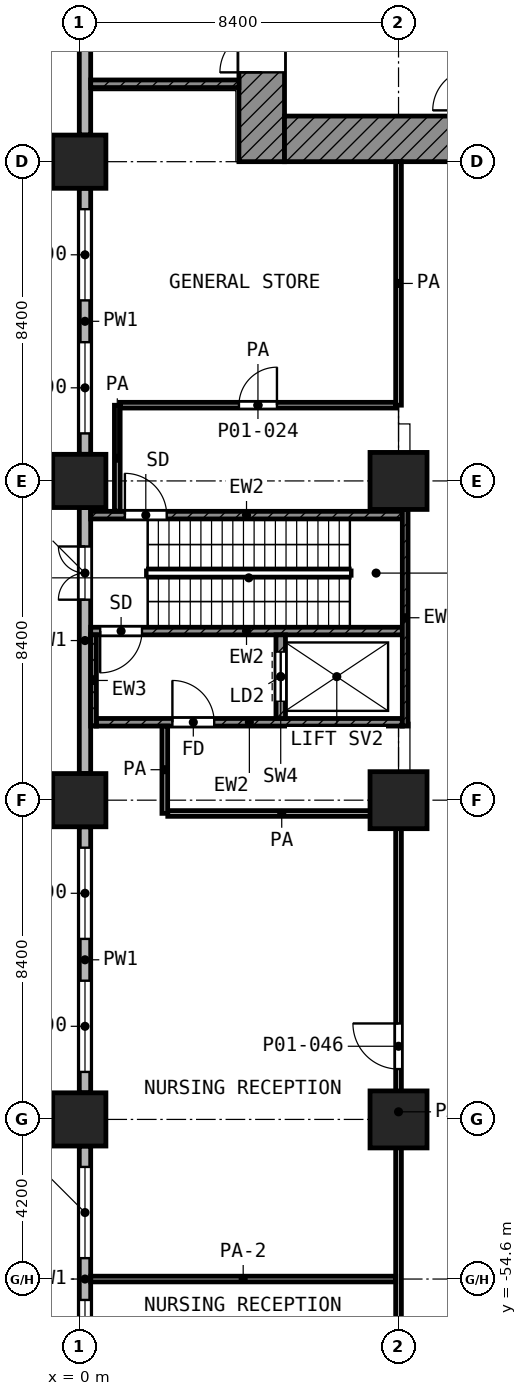
"""IFC4 building model, lengths in metres.
Left out: names, types, materials, properties, quantities, classifications, styles, units other than length and angle.
Written with IfcOpenShell. Run it as: python <this file> out.ifc"""

import sys

from ifc_helpers import new_model, si_unit, direction, frame, frame_2d, origin, origin_2d, place, context, subcontext, project, spatial, rectangle, extrude, element, fill, save


model = new_model("IFC4")
c1 = context("Model", 3, precision=1e-05, world=origin(), true_north=direction((0.0, 1.0)))
c2 = subcontext(c1, "Body", "Model", "MODEL_VIEW")
j1 = project(units=[si_unit("LENGTHUNIT", "METRE"), si_unit("PLANEANGLEUNIT", "RADIAN")], contexts=[c1])
p1 = place(None, origin())
s1 = spatial("IfcSite", under=j1, at=p1, CompositionType="ELEMENT")
p2 = place(p1, origin())
s2 = spatial("IfcBuilding", under=s1, at=p2, CompositionType="ELEMENT")
p3 = place(p2, origin())
s3 = spatial("IfcBuildingStorey", under=s2, at=p3, CompositionType="ELEMENT", Elevation=0.0)
for number, where, z_axis, x_axis in (
    (1, (0.0, -25.2, 0.0), (0.0, 0.0, 1.0), (1.0, 0.0, 0.0)),
    (2, (0.0, -33.6, 0.0), (0.0, 0.0, 1.0), (1.0, 0.0, 0.0)),
):
    element("IfcColumn", number, at=place(p3, frame(where, z_axis=z_axis, x_axis=x_axis)), inside=s3, PredefinedType="COLUMN", context=c2, shape_type="SweptSolid", body=[
        extrude(rectangle(XDim=1.4, YDim=1.4, at=origin_2d()), origin(), (0.0, 0.0, 1.0), 7.0),
    ])
p4 = place(p3, frame((8.4, -33.6, 0.0), z_axis=(0.0, 0.0, 1.0), x_axis=(1.0, 0.0, 0.0)))
e3 = element("IfcColumn", 3, at=p4, inside=s3, PredefinedType="COLUMN", context=c2, shape_type="SweptSolid", body=[
    extrude(rectangle(XDim=1.5, YDim=1.5, at=origin_2d()), origin(), (0.0, 0.0, 1.0), 7.0),
])
p5 = place(p3, frame((0.0, -42.0, 0.0), z_axis=(0.0, 0.0, 1.0), x_axis=(1.0, 0.0, 0.0)))
e4 = element("IfcColumn", 4, at=p5, inside=s3, PredefinedType="COLUMN", context=c2, shape_type="SweptSolid", body=[
    extrude(rectangle(XDim=1.4, YDim=1.4, at=origin_2d()), origin(), (0.0, 0.0, 1.0), 7.0),
])
p6 = place(p3, frame((8.4, -42.0, 0.0), z_axis=(0.0, 0.0, 1.0), x_axis=(1.0, 0.0, 0.0)))
e5 = element("IfcColumn", 5, at=p6, inside=s3, PredefinedType="COLUMN", context=c2, shape_type="SweptSolid", body=[
    extrude(rectangle(XDim=1.5, YDim=1.5, at=origin_2d()), origin(), (0.0, 0.0, 1.0), 7.0),
])
p7 = place(p3, frame((0.0, -50.4, 0.0), z_axis=(0.0, 0.0, 1.0), x_axis=(1.0, 0.0, 0.0)))
e6 = element("IfcColumn", 6, at=p7, inside=s3, PredefinedType="COLUMN", context=c2, shape_type="SweptSolid", body=[
    extrude(rectangle(XDim=1.4, YDim=1.4, at=origin_2d()), origin(), (0.0, 0.0, 1.0), 7.0),
])
p8 = place(p3, frame((8.4, -50.4, 0.0), z_axis=(0.0, 0.0, 1.0), x_axis=(1.0, 0.0, 0.0)))
e7 = element("IfcColumn", 7, at=p8, inside=s3, PredefinedType="COLUMN", context=c2, shape_type="SweptSolid", body=[
    extrude(rectangle(XDim=1.5, YDim=1.5, at=origin_2d()), origin(), (0.0, 0.0, 1.0), 7.0),
])
p9 = place(p3, frame((0.15, -17.5, 0.0), z_axis=(0.0, 0.0, 1.0), x_axis=(0.0, -1.0, 0.0)))
e8 = element("IfcWall", 8, at=p9, inside=s3, PredefinedType="SOLIDWALL", context=c2, shape_type="SweptSolid", body=[
    extrude(rectangle(XDim=7.0, YDim=0.3, at=frame_2d((3.5, 0.0))), origin(), (0.0, 0.0, 1.0), 5.25),
])
p10 = place(p9, frame((0.825, 0.0, 0.0)))
e9 = element("IfcOpeningElement", 9, at=p10, cuts=e8, PredefinedType="OPENING", context=c2, shape_type="SweptSolid", body=[
    extrude(rectangle(XDim=1.4, YDim=2.1, at=frame_2d((0.7, 1.05))), frame((0.0, 0.16, 0.0), z_axis=(0.0, -1.0, 0.0), x_axis=(1.0, 0.0, 0.0)), (0.0, 0.0, 1.0), 0.32),
])
p11 = place(p3, frame((0.15, -25.9, 0.0), z_axis=(0.0, 0.0, 1.0), x_axis=(0.0, -1.0, 0.0)))
e10 = element("IfcWall", 10, at=p11, inside=s3, PredefinedType="SOLIDWALL", context=c2, shape_type="SweptSolid", body=[
    extrude(rectangle(XDim=7.0, YDim=0.3, at=frame_2d((3.5, 0.0))), origin(), (0.0, 0.0, 1.0), 5.25),
])
p12 = place(p11, frame((0.55, 0.0, 1.0)))
e11 = element("IfcOpeningElement", 11, at=p12, cuts=e10, PredefinedType="OPENING", context=c2, shape_type="SweptSolid", body=[
    extrude(rectangle(XDim=2.4, YDim=1.8, at=frame_2d((1.2, 0.9))), frame((0.0, 0.16, 0.0), z_axis=(0.0, -1.0, 0.0), x_axis=(1.0, 0.0, 0.0)), (0.0, 0.0, 1.0), 0.32),
])
p13 = place(p11, frame((4.05, 0.0, 1.0)))
e12 = element("IfcOpeningElement", 12, at=p13, cuts=e10, PredefinedType="OPENING", context=c2, shape_type="SweptSolid", body=[
    extrude(rectangle(XDim=2.4, YDim=1.8, at=frame_2d((1.2, 0.9))), frame((0.0, 0.16, 0.0), z_axis=(0.0, -1.0, 0.0), x_axis=(1.0, 0.0, 0.0)), (0.0, 0.0, 1.0), 0.32),
])
p14 = place(p3, frame((0.15, -34.3, 0.0), z_axis=(0.0, 0.0, 1.0), x_axis=(0.0, -1.0, 0.0)))
e13 = element("IfcWall", 13, at=p14, inside=s3, PredefinedType="SOLIDWALL", context=c2, shape_type="SweptSolid", body=[
    extrude(rectangle(XDim=7.0, YDim=0.3, at=frame_2d((3.5, 0.0))), origin(), (0.0, 0.0, 1.0), 5.25),
])
p15 = place(p14, frame((1.025, 0.0, 0.0)))
e14 = element("IfcOpeningElement", 14, at=p15, cuts=e13, PredefinedType="OPENING", context=c2, shape_type="SweptSolid", body=[
    extrude(rectangle(XDim=1.4, YDim=2.1, at=frame_2d((0.7, 1.05))), frame((0.0, 0.16, 0.0), z_axis=(0.0, -1.0, 0.0), x_axis=(1.0, 0.0, 0.0)), (0.0, 0.0, 1.0), 0.32),
])
p16 = place(p3, frame((0.15, -42.7, 0.0), z_axis=(0.0, 0.0, 1.0), x_axis=(0.0, -1.0, 0.0)))
e15 = element("IfcWall", 15, at=p16, inside=s3, PredefinedType="SOLIDWALL", context=c2, shape_type="SweptSolid", body=[
    extrude(rectangle(XDim=7.0, YDim=0.3, at=frame_2d((3.5, 0.0))), origin(), (0.0, 0.0, 1.0), 5.25),
])
p17 = place(p16, frame((0.55, 0.0, 1.0)))
e16 = element("IfcOpeningElement", 16, at=p17, cuts=e15, PredefinedType="OPENING", context=c2, shape_type="SweptSolid", body=[
    extrude(rectangle(XDim=2.4, YDim=1.8, at=frame_2d((1.2, 0.9))), frame((0.0, 0.16, 0.0), z_axis=(0.0, -1.0, 0.0), x_axis=(1.0, 0.0, 0.0)), (0.0, 0.0, 1.0), 0.32),
])
p18 = place(p16, frame((4.05, 0.0, 1.0)))
e17 = element("IfcOpeningElement", 17, at=p18, cuts=e15, PredefinedType="OPENING", context=c2, shape_type="SweptSolid", body=[
    extrude(rectangle(XDim=2.4, YDim=1.8, at=frame_2d((1.2, 0.9))), frame((0.0, 0.16, 0.0), z_axis=(0.0, -1.0, 0.0), x_axis=(1.0, 0.0, 0.0)), (0.0, 0.0, 1.0), 0.32),
])
p19 = place(p3, frame((0.15, -51.1, 0.0), z_axis=(0.0, 0.0, 1.0), x_axis=(0.0, -1.0, 0.0)))
e18 = element("IfcWall", 18, at=p19, inside=s3, PredefinedType="SOLIDWALL", context=c2, shape_type="SweptSolid", body=[
    extrude(rectangle(XDim=7.0, YDim=0.3, at=frame_2d((3.5, 0.0))), origin(), (0.0, 0.0, 1.0), 5.25),
])
p20 = place(p19, frame((0.55, 0.0, 1.0)))
e19 = element("IfcOpeningElement", 19, at=p20, cuts=e18, PredefinedType="OPENING", context=c2, shape_type="SweptSolid", body=[
    extrude(rectangle(XDim=2.4, YDim=1.8, at=frame_2d((1.2, 0.9))), frame((0.0, 0.16, 0.0), z_axis=(0.0, -1.0, 0.0), x_axis=(1.0, 0.0, 0.0)), (0.0, 0.0, 1.0), 0.32),
])
p21 = place(p19, frame((4.05, 0.0, 1.0)))
e20 = element("IfcOpeningElement", 20, at=p21, cuts=e18, PredefinedType="OPENING", context=c2, shape_type="SweptSolid", body=[
    extrude(rectangle(XDim=2.4, YDim=1.8, at=frame_2d((1.2, 0.9))), frame((0.0, 0.16, 0.0), z_axis=(0.0, -1.0, 0.0), x_axis=(1.0, 0.0, 0.0)), (0.0, 0.0, 1.0), 0.32),
])
p22 = place(p3, frame((4.8, -25.2, 0.0), z_axis=(0.0, 0.0, 1.0), x_axis=(0.0, 1.0, 0.0)))
e21 = element("IfcWall", 21, at=p22, inside=s3, PredefinedType="SHEAR", context=c2, shape_type="SweptSolid", body=[
    extrude(rectangle(XDim=19.8, YDim=1.2, at=frame_2d((9.9, 0.0))), origin(), (0.0, 0.0, 1.0), 6.65),
])
p23 = place(p22, frame((11.65, 0.0, 0.0)))
e22 = element("IfcOpeningElement", 22, at=p23, cuts=e21, PredefinedType="OPENING", context=c2, shape_type="SweptSolid", body=[
    extrude(rectangle(XDim=1.1, YDim=2.1, at=frame_2d((0.55, 1.05))), frame((0.0, 0.61, 0.0), z_axis=(0.0, -1.0, 0.0), x_axis=(1.0, 0.0, 0.0)), (0.0, 0.0, 1.0), 1.22),
])
p24 = place(p22, frame((2.35, 0.0, 0.0)))
e23 = element("IfcOpeningElement", 23, at=p24, cuts=e21, PredefinedType="OPENING", context=c2, shape_type="SweptSolid", body=[
    extrude(rectangle(XDim=1.1, YDim=2.1, at=frame_2d((0.55, 1.05))), frame((0.0, 0.61, 0.0), z_axis=(0.0, -1.0, 0.0), x_axis=(1.0, 0.0, 0.0)), (0.0, 0.0, 1.0), 1.22),
])
p25 = place(p3, frame((5.4, -24.6, 0.0), z_axis=(0.0, 0.0, 1.0), x_axis=(1.0, 0.0, 0.0)))
e24 = element("IfcWall", 24, at=p25, inside=s3, PredefinedType="SHEAR", context=c2, shape_type="SweptSolid", body=[
    extrude(rectangle(XDim=18.6, YDim=1.2, at=frame_2d((9.3, 0.0))), origin(), (0.0, 0.0, 1.0), 6.65),
])
p26 = place(p25, frame((6.3, 0.0, 0.0)))
e25 = element("IfcOpeningElement", 25, at=p26, cuts=e24, PredefinedType="OPENING", context=c2, shape_type="SweptSolid", body=[
    extrude(rectangle(XDim=1.8, YDim=2.1, at=frame_2d((0.9, 1.05))), frame((0.0, 0.61, 0.0), z_axis=(0.0, -1.0, 0.0), x_axis=(1.0, 0.0, 0.0)), (0.0, 0.0, 1.0), 1.22),
])
p27 = place(p3, frame((0.3, -23.15, 0.0), z_axis=(0.0, 0.0, 1.0), x_axis=(1.0, 0.0, 0.0)))
e26 = element("IfcWall", 26, at=p27, inside=s3, PredefinedType="SHEAR", context=c2, shape_type="SweptSolid", body=[
    extrude(rectangle(XDim=3.9, YDim=0.2, at=frame_2d((1.95, 0.0))), origin(), (0.0, 0.0, 1.0), 6.65),
])
p28 = place(p3, frame((0.375, -40.05, 0.0), z_axis=(0.0, 0.0, 1.0), x_axis=(0.0, 1.0, 0.0)))
e27 = element("IfcWall", 27, at=p28, inside=s3, PredefinedType="SHEAR", context=c2, shape_type="SweptSolid", body=[
    extrude(rectangle(XDim=2.4, YDim=0.15, at=frame_2d((1.2, 0.0))), origin(), (0.0, 0.0, 1.0), 6.65),
])
p29 = place(p3, frame((8.575, -40.05, 0.0), z_axis=(0.0, 0.0, 1.0), x_axis=(0.0, 1.0, 0.0)))
e28 = element("IfcWall", 28, at=p29, inside=s3, PredefinedType="SHEAR", context=c2, shape_type="SweptSolid", body=[
    extrude(rectangle(XDim=5.7, YDim=0.15, at=frame_2d((2.85, 0.0))), origin(), (0.0, 0.0, 1.0), 6.65),
])
p30 = place(p3, frame((0.3, -34.5, 0.0), z_axis=(0.0, 0.0, 1.0), x_axis=(1.0, 0.0, 0.0)))
e29 = element("IfcWall", 29, at=p30, inside=s3, PredefinedType="SHEAR", context=c2, shape_type="SweptSolid", body=[
    extrude(rectangle(XDim=8.2, YDim=0.2, at=frame_2d((4.1, 0.0))), origin(), (0.0, 0.0, 1.0), 6.65),
])
p31 = place(p30, frame((0.9, 0.0, 0.0)))
e30 = element("IfcOpeningElement", 30, at=p31, cuts=e29, PredefinedType="OPENING", context=c2, shape_type="SweptSolid", body=[
    extrude(rectangle(XDim=1.1, YDim=2.1, at=frame_2d((0.55, 1.05))), frame((0.0, 0.11, 0.0), z_axis=(0.0, -1.0, 0.0), x_axis=(1.0, 0.0, 0.0)), (0.0, 0.0, 1.0), 0.22),
])
p32 = place(p3, frame((0.3, -37.55, 0.0), z_axis=(0.0, 0.0, 1.0), x_axis=(1.0, 0.0, 0.0)))
e31 = element("IfcWall", 31, at=p32, inside=s3, PredefinedType="SHEAR", context=c2, shape_type="SweptSolid", body=[
    extrude(rectangle(XDim=8.2, YDim=0.2, at=frame_2d((4.1, 0.0))), origin(), (0.0, 0.0, 1.0), 6.65),
])
p33 = place(p32, frame((0.25, 0.0, 0.0)))
e32 = element("IfcOpeningElement", 32, at=p33, cuts=e31, PredefinedType="OPENING", context=c2, shape_type="SweptSolid", body=[
    extrude(rectangle(XDim=1.1, YDim=2.1, at=frame_2d((0.55, 1.05))), frame((0.0, 0.11, 0.0), z_axis=(0.0, -1.0, 0.0), x_axis=(1.0, 0.0, 0.0)), (0.0, 0.0, 1.0), 0.22),
])
p34 = place(p3, frame((0.45, -39.95, 0.0), z_axis=(0.0, 0.0, 1.0), x_axis=(1.0, 0.0, 0.0)))
e33 = element("IfcWall", 33, at=p34, inside=s3, PredefinedType="SHEAR", context=c2, shape_type="SweptSolid", body=[
    extrude(rectangle(XDim=8.05, YDim=0.2, at=frame_2d((4.025, 0.0))), origin(), (0.0, 0.0, 1.0), 6.65),
])
p35 = place(p34, frame((2.0, 0.0, 0.0)))
e34 = element("IfcOpeningElement", 34, at=p35, cuts=e33, PredefinedType="OPENING", context=c2, shape_type="SweptSolid", body=[
    extrude(rectangle(XDim=1.1, YDim=2.1, at=frame_2d((0.55, 1.05))), frame((0.0, 0.11, 0.0), z_axis=(0.0, -1.0, 0.0), x_axis=(1.0, 0.0, 0.0)), (0.0, 0.0, 1.0), 0.22),
])
p36 = place(p3, frame((5.3, -39.85, 0.0), z_axis=(0.0, 0.0, 1.0), x_axis=(0.0, 1.0, 0.0)))
e35 = element("IfcWall", 35, at=p36, inside=s3, PredefinedType="SHEAR", context=c2, shape_type="SweptSolid", body=[
    extrude(rectangle(XDim=2.2, YDim=0.25, at=frame_2d((1.1, 0.0))), origin(), (0.0, 0.0, 1.0), 6.65),
])
p37 = place(p36, frame((0.45, 0.0, 0.0)))
e36 = element("IfcOpeningElement", 36, at=p37, cuts=e35, PredefinedType="OPENING", context=c2, shape_type="SweptSolid", body=[
    extrude(rectangle(XDim=1.3, YDim=2.1, at=frame_2d((0.65, 1.05))), frame((0.0, 0.135, 0.0), z_axis=(0.0, -1.0, 0.0), x_axis=(1.0, 0.0, 0.0)), (0.0, 0.0, 1.0), 0.27),
])
p38 = place(p3, frame((0.3, -54.6, 0.0), z_axis=(0.0, 0.0, 1.0), x_axis=(1.0, 0.0, 0.0)))
e37 = element("IfcWall", 37, at=p38, inside=s3, PredefinedType="PARTITIONING", context=c2, shape_type="SweptSolid", body=[
    extrude(rectangle(XDim=8.025, YDim=0.15, at=frame_2d((4.012, 0.0))), origin(), (0.0, 0.0, 1.0), 5.25),
])
p39 = place(p3, frame((2.328, -42.35, 0.0), z_axis=(0.0, 0.0, 1.0), x_axis=(1.0, 0.0, 0.0)))
e38 = element("IfcWall", 38, at=p39, inside=s3, PredefinedType="PARTITIONING", context=c2, shape_type="SweptSolid", body=[
    extrude(rectangle(XDim=5.997, YDim=0.15, at=frame_2d((2.999, 0.0))), origin(), (0.0, 0.0, 1.0), 6.65),
])
p40 = place(p3, frame((1.077, -31.607, 0.0), z_axis=(0.0, 0.0, 1.0), x_axis=(1.0, 0.0, 0.0)))
e39 = element("IfcWall", 39, at=p40, inside=s3, PredefinedType="PARTITIONING", context=c2, shape_type="SweptSolid", body=[
    extrude(rectangle(XDim=7.248, YDim=0.15, at=frame_2d((3.624, 0.0))), origin(), (0.0, 0.0, 1.0), 6.65),
])
p41 = place(p40, frame((3.124, 0.0, 0.0)))
e40 = element("IfcOpeningElement", 40, at=p41, cuts=e39, PredefinedType="OPENING", context=c2, shape_type="SweptSolid", body=[
    extrude(rectangle(XDim=1.0, YDim=2.1, at=frame_2d((0.5, 1.05))), frame((0.0, 0.085, 0.0), z_axis=(0.0, -1.0, 0.0), x_axis=(1.0, 0.0, 0.0)), (0.0, 0.0, 1.0), 0.17),
])
p42 = place(p3, frame((1.0, -34.396, 0.0), z_axis=(0.0, 0.0, 1.0), x_axis=(0.0, 1.0, 0.0)))
e41 = element("IfcWall", 41, at=p42, inside=s3, PredefinedType="PARTITIONING", context=c2, shape_type="SweptSolid", body=[
    extrude(rectangle(XDim=2.787, YDim=0.15, at=frame_2d((1.394, 0.0))), origin(), (0.0, 0.0, 1.0), 6.65),
])
p43 = place(p3, frame((2.25, -42.347, 0.0), z_axis=(0.0, 0.0, 1.0), x_axis=(0.0, 1.0, 0.0)))
e42 = element("IfcWall", 42, at=p43, inside=s3, PredefinedType="PARTITIONING", context=c2, shape_type="SweptSolid", body=[
    extrude(rectangle(XDim=2.297, YDim=0.15, at=frame_2d((1.148, 0.0))), origin(), (0.0, 0.0, 1.0), 6.65),
])
p44 = place(p3, frame((8.4, -58.05, 0.0), z_axis=(0.0, 0.0, 1.0), x_axis=(0.0, 1.0, 0.0)))
e43 = element("IfcWall", 43, at=p44, inside=s3, PredefinedType="PARTITIONING", context=c2, shape_type="SweptSolid", body=[
    extrude(rectangle(XDim=15.7, YDim=0.15, at=frame_2d((7.85, 0.0))), origin(), (0.0, 0.0, 1.0), 6.65),
])
p45 = place(p44, frame((8.975, 0.0, 0.0)))
e44 = element("IfcOpeningElement", 44, at=p45, cuts=e43, PredefinedType="OPENING", context=c2, shape_type="SweptSolid", body=[
    extrude(rectangle(XDim=1.2, YDim=2.1, at=frame_2d((0.6, 1.05))), frame((0.0, 0.085, 0.0), z_axis=(0.0, -1.0, 0.0), x_axis=(1.0, 0.0, 0.0)), (0.0, 0.0, 1.0), 0.17),
])
p46 = place(p44, frame((1.125, 0.0, 0.0)))
e45 = element("IfcOpeningElement", 45, at=p46, cuts=e43, PredefinedType="OPENING", context=c2, shape_type="SweptSolid", body=[
    extrude(rectangle(XDim=1.2, YDim=2.1, at=frame_2d((0.6, 1.05))), frame((0.0, 0.085, 0.0), z_axis=(0.0, -1.0, 0.0), x_axis=(1.0, 0.0, 0.0)), (0.0, 0.0, 1.0), 0.17),
])
p47 = place(p3, frame((8.4, -31.607, 0.0), z_axis=(0.0, 0.0, 1.0), x_axis=(0.0, 1.0, 0.0)))
e46 = element("IfcWall", 46, at=p47, inside=s3, PredefinedType="PARTITIONING", context=c2, shape_type="SweptSolid", body=[
    extrude(rectangle(XDim=6.407, YDim=0.15, at=frame_2d((3.204, 0.0))), origin(), (0.0, 0.0, 1.0), 6.65),
])
p48 = place(p12, origin())
e47 = element("IfcWindow", 47, at=p48, inside=s3, PartitioningType="SINGLE_PANEL", PredefinedType="WINDOW", context=c2, shape_type="SweptSolid", body=[
    extrude(rectangle(XDim=2.4, YDim=1.8, at=frame_2d((1.2, 0.9))), frame((0.0, 0.03, 0.0), z_axis=(0.0, -1.0, 0.0), x_axis=(1.0, 0.0, 0.0)), (0.0, 0.0, 1.0), 0.06),
])
fill(e11, e47)
p49 = place(p13, origin())
e48 = element("IfcWindow", 48, at=p49, inside=s3, PartitioningType="SINGLE_PANEL", PredefinedType="WINDOW", context=c2, shape_type="SweptSolid", body=[
    extrude(rectangle(XDim=2.4, YDim=1.8, at=frame_2d((1.2, 0.9))), frame((0.0, 0.03, 0.0), z_axis=(0.0, -1.0, 0.0), x_axis=(1.0, 0.0, 0.0)), (0.0, 0.0, 1.0), 0.06),
])
fill(e12, e48)
p50 = place(p15, frame((1.4, 0.0, 0.0), z_axis=(0.0, 0.0, 1.0), x_axis=(-1.0, 0.0, 0.0)))
e49 = element("IfcDoor", 49, at=p50, inside=s3, OperationType="DOUBLE_DOOR_SINGLE_SWING", PredefinedType="DOOR", context=c2, shape_type="SweptSolid", body=[
    extrude(rectangle(XDim=1.4, YDim=2.1, at=frame_2d((0.7, 1.05))), frame((0.0, 0.025, 0.0), z_axis=(0.0, -1.0, 0.0), x_axis=(1.0, 0.0, 0.0)), (0.0, 0.0, 1.0), 0.05),
])
fill(e14, e49)
p51 = place(p17, origin())
e50 = element("IfcWindow", 50, at=p51, inside=s3, PartitioningType="SINGLE_PANEL", PredefinedType="WINDOW", context=c2, shape_type="SweptSolid", body=[
    extrude(rectangle(XDim=2.4, YDim=1.8, at=frame_2d((1.2, 0.9))), frame((0.0, 0.03, 0.0), z_axis=(0.0, -1.0, 0.0), x_axis=(1.0, 0.0, 0.0)), (0.0, 0.0, 1.0), 0.06),
])
fill(e16, e50)
p52 = place(p18, origin())
e51 = element("IfcWindow", 51, at=p52, inside=s3, PartitioningType="SINGLE_PANEL", PredefinedType="WINDOW", context=c2, shape_type="SweptSolid", body=[
    extrude(rectangle(XDim=2.4, YDim=1.8, at=frame_2d((1.2, 0.9))), frame((0.0, 0.03, 0.0), z_axis=(0.0, -1.0, 0.0), x_axis=(1.0, 0.0, 0.0)), (0.0, 0.0, 1.0), 0.06),
])
fill(e17, e51)
p53 = place(p20, origin())
e52 = element("IfcWindow", 52, at=p53, inside=s3, PartitioningType="SINGLE_PANEL", PredefinedType="WINDOW", context=c2, shape_type="SweptSolid", body=[
    extrude(rectangle(XDim=2.4, YDim=1.8, at=frame_2d((1.2, 0.9))), frame((0.0, 0.03, 0.0), z_axis=(0.0, -1.0, 0.0), x_axis=(1.0, 0.0, 0.0)), (0.0, 0.0, 1.0), 0.06),
])
fill(e19, e52)
p54 = place(p21, origin())
e53 = element("IfcWindow", 53, at=p54, inside=s3, PartitioningType="SINGLE_PANEL", PredefinedType="WINDOW", context=c2, shape_type="SweptSolid", body=[
    extrude(rectangle(XDim=2.4, YDim=1.8, at=frame_2d((1.2, 0.9))), frame((0.0, 0.03, 0.0), z_axis=(0.0, -1.0, 0.0), x_axis=(1.0, 0.0, 0.0)), (0.0, 0.0, 1.0), 0.06),
])
fill(e20, e53)
p55 = place(p24, origin())
e54 = element("IfcDoor", 54, at=p55, inside=s3, OperationType="SINGLE_SWING_LEFT", PredefinedType="DOOR", context=c2, shape_type="SweptSolid", body=[
    extrude(rectangle(XDim=1.1, YDim=2.1, at=frame_2d((0.55, 1.05))), frame((0.0, 0.025, 0.0), z_axis=(0.0, -1.0, 0.0), x_axis=(1.0, 0.0, 0.0)), (0.0, 0.0, 1.0), 0.05),
])
fill(e23, e54)
p56 = place(p31, origin())
e55 = element("IfcDoor", 55, at=p56, inside=s3, OperationType="SINGLE_SWING_LEFT", PredefinedType="DOOR", context=c2, shape_type="SweptSolid", body=[
    extrude(rectangle(XDim=1.1, YDim=2.1, at=frame_2d((0.55, 1.05))), frame((0.0, 0.025, 0.0), z_axis=(0.0, -1.0, 0.0), x_axis=(1.0, 0.0, 0.0)), (0.0, 0.0, 1.0), 0.05),
])
fill(e30, e55)
p57 = place(p33, frame((1.1, 0.0, 0.0), z_axis=(0.0, 0.0, 1.0), x_axis=(-1.0, 0.0, 0.0)))
e56 = element("IfcDoor", 56, at=p57, inside=s3, OperationType="SINGLE_SWING_LEFT", PredefinedType="DOOR", context=c2, shape_type="SweptSolid", body=[
    extrude(rectangle(XDim=1.1, YDim=2.1, at=frame_2d((0.55, 1.05))), frame((0.0, 0.025, 0.0), z_axis=(0.0, -1.0, 0.0), x_axis=(1.0, 0.0, 0.0)), (0.0, 0.0, 1.0), 0.05),
])
fill(e32, e56)
p58 = place(p37, origin())
e57 = element("IfcDoor", 57, at=p58, inside=s3, OperationType="DOUBLE_DOOR_SLIDING", PredefinedType="DOOR", context=c2, shape_type="SweptSolid", body=[
    extrude(rectangle(XDim=1.3, YDim=2.1, at=frame_2d((0.65, 1.05))), frame((0.0, 0.025, 0.0), z_axis=(0.0, -1.0, 0.0), x_axis=(1.0, 0.0, 0.0)), (0.0, 0.0, 1.0), 0.05),
])
fill(e36, e57)
p59 = place(p35, origin())
e58 = element("IfcDoor", 58, at=p59, inside=s3, OperationType="SINGLE_SWING_LEFT", PredefinedType="DOOR", context=c2, shape_type="SweptSolid", body=[
    extrude(rectangle(XDim=1.1, YDim=2.1, at=frame_2d((0.55, 1.05))), frame((0.0, 0.025, 0.0), z_axis=(0.0, -1.0, 0.0), x_axis=(1.0, 0.0, 0.0)), (0.0, 0.0, 1.0), 0.05),
])
fill(e34, e58)
p60 = place(p41, origin())
e59 = element("IfcDoor", 59, at=p60, inside=s3, OperationType="SINGLE_SWING_RIGHT", PredefinedType="DOOR", context=c2, shape_type="SweptSolid", body=[
    extrude(rectangle(XDim=1.0, YDim=2.1, at=frame_2d((0.5, 1.05))), frame((0.0, 0.025, 0.0), z_axis=(0.0, -1.0, 0.0), x_axis=(1.0, 0.0, 0.0)), (0.0, 0.0, 1.0), 0.05),
])
fill(e40, e59)
p61 = place(p45, origin())
e60 = element("IfcDoor", 60, at=p61, inside=s3, OperationType="SINGLE_SWING_RIGHT", PredefinedType="DOOR", context=c2, shape_type="SweptSolid", body=[
    extrude(rectangle(XDim=1.2, YDim=2.1, at=frame_2d((0.6, 1.05))), frame((0.0, 0.025, 0.0), z_axis=(0.0, -1.0, 0.0), x_axis=(1.0, 0.0, 0.0)), (0.0, 0.0, 1.0), 0.05),
])
fill(e44, e60)
save(model, sys.argv[1])
